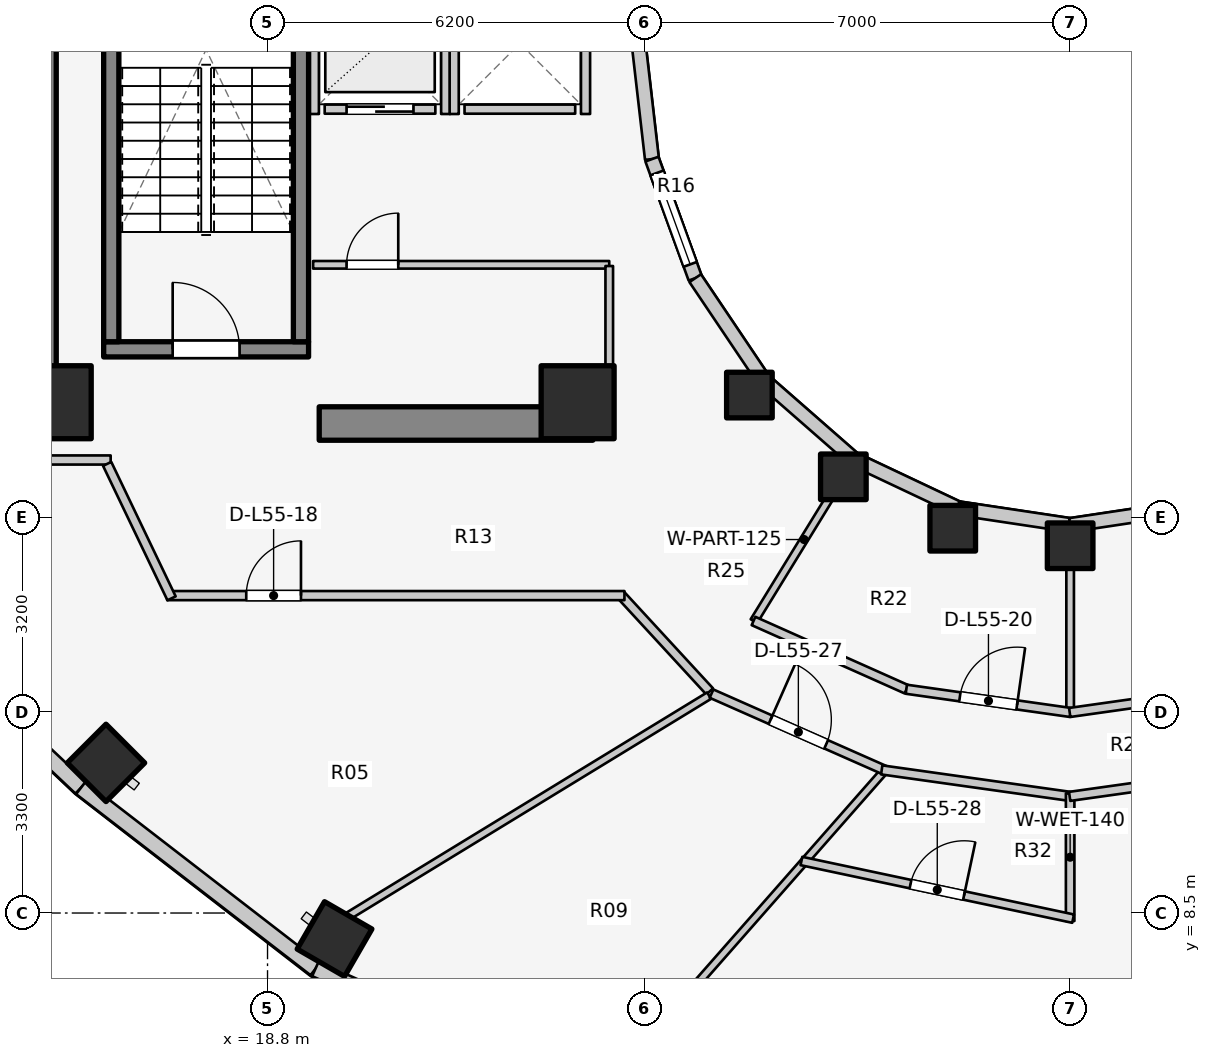
"""IFC4 building model, lengths in metres.
Left out: names, types, materials, properties, quantities, classifications, styles, units other than length and angle.
Written with IfcOpenShell. Run it as: python <this file> out.ifc"""

import sys

from ifc_helpers import new_model, si_unit, direction, frame, frame_2d, origin, origin_2d, place, context, subcontext, project, spatial, rectangle, extrude, element, fill, save


model = new_model("IFC4")
c1 = context("Model", 3, precision=1e-05, world=origin(), true_north=direction((0.0, 1.0)))
c2 = subcontext(c1, "Body", "Model", "MODEL_VIEW")
j1 = project(units=[si_unit("LENGTHUNIT", "METRE"), si_unit("PLANEANGLEUNIT", "RADIAN")], contexts=[c1])
p1 = place(None, origin())
s1 = spatial("IfcSite", under=j1, at=p1, CompositionType="ELEMENT")
p2 = place(p1, origin())
s2 = spatial("IfcBuilding", under=s1, at=p2, CompositionType="ELEMENT")
p3 = place(p2, frame((0.0, 0.0, 180.8)))
s3 = spatial("IfcBuildingStorey", under=s2, at=p3, CompositionType="ELEMENT", Elevation=180.8)
p4 = place(p3, frame((15.05, 17.05, 0.0), z_axis=(0.0, 0.0, 1.0), x_axis=(0.0, 1.0, 0.0)))
e1 = element("IfcWall", 1, at=p4, inside=s3, PredefinedType="SHEAR", context=c2, shape_type="SweptSolid", body=[
    extrude(rectangle(XDim=12.8, YDim=0.55, at=frame_2d((6.4, 0.0))), origin(), (0.0, 0.0, 1.0), 3.1),
])
p5 = place(p3, frame((19.65, 16.55, 0.0), z_axis=(0.0, 0.0, 1.0), x_axis=(1.0, 0.0, 0.0)))
e2 = element("IfcWall", 2, at=p5, inside=s3, PredefinedType="SHEAR", context=c2, shape_type="SweptSolid", body=[
    extrude(rectangle(XDim=4.5, YDim=0.55, at=frame_2d((2.25, 0.0))), origin(), (0.0, 0.0, 1.0), 3.1),
])
p6 = place(p3, frame((16.105, 17.77, 0.0), z_axis=(0.0, 0.0, 1.0), x_axis=(1.0, 0.0, 0.0)))
e3 = element("IfcWall", 3, at=p6, inside=s3, PredefinedType="SOLIDWALL", context=c2, shape_type="SweptSolid", body=[
    extrude(rectangle(XDim=3.37, YDim=0.25, at=frame_2d((1.685, 0.0))), origin(), (0.0, 0.0, 1.0), 3.1),
])
p7 = place(p6, frame((1.135, 0.0, 0.0)))
e4 = element("IfcOpeningElement", 4, at=p7, cuts=e3, PredefinedType="OPENING", context=c2, shape_type="SweptSolid", body=[
    extrude(rectangle(XDim=1.1, YDim=2.1, at=frame_2d((0.55, 1.05))), frame((0.0, 0.135, 0.0), z_axis=(0.0, -1.0, 0.0), x_axis=(1.0, 0.0, 0.0)), (0.0, 0.0, 1.0), 0.27),
])
for number, where, z_axis, x_axis in (
    (5, (16.23, 17.895, 0.0), (0.0, 0.0, 1.0), (0.0, 1.0, 0.0)),
    (6, (19.35, 17.895, 0.0), (0.0, 0.0, 1.0), (0.0, 1.0, 0.0)),
):
    element("IfcWall", number, at=place(p3, frame(where, z_axis=z_axis, x_axis=x_axis)), inside=s3, PredefinedType="SOLIDWALL", context=c2, shape_type="SweptSolid", body=[
        extrude(rectangle(XDim=7.81, YDim=0.25, at=frame_2d((3.905, 0.0))), origin(), (0.0, 0.0, 1.0), 3.1),
    ])
for number, where, z_axis, x_axis in (
    (7, (15.3, 16.9, 0.0), (0.0, 0.0, 1.0), (1.0, 0.0, 0.0)),
    (8, (23.9, 16.9, 0.0), (0.0, 0.0, 1.0), (1.0, 0.0, 0.0)),
):
    element("IfcColumn", number, at=place(p3, frame(where, z_axis=z_axis, x_axis=x_axis)), inside=s3, PredefinedType="COLUMN", context=c2, shape_type="SweptSolid", body=[
        extrude(rectangle(XDim=1.2, YDim=1.2, at=origin_2d()), origin(), (0.0, 0.0, 1.0), 3.1),
    ])
p8 = place(p3, frame((26.725, 17.018, 0.0), z_axis=(0.0, 0.0, 1.0), x_axis=(1.0, 0.0, 0.0)))
e9 = element("IfcColumn", 9, at=p8, inside=s3, PredefinedType="COLUMN", context=c2, shape_type="SweptSolid", body=[
    extrude(rectangle(XDim=0.75, YDim=0.75, at=origin_2d()), origin(), (0.0, 0.0, 1.0), 3.1),
])
p9 = place(p3, frame((16.143, 10.969, 0.0), z_axis=(0.0, 0.0, 1.0), x_axis=(-0.707106781187, -0.707106781187, 0.0)))
e10 = element("IfcColumn", 10, at=p9, inside=s3, PredefinedType="COLUMN", context=c2, shape_type="SweptSolid", body=[
    extrude(rectangle(XDim=0.9, YDim=0.9, at=origin_2d()), origin(), (0.0, 0.0, 1.0), 3.1),
])
p10 = place(p3, frame((28.27, 15.673, 0.0), z_axis=(0.0, 0.0, 1.0), x_axis=(1.0, 0.0, 0.0)))
e11 = element("IfcColumn", 11, at=p10, inside=s3, PredefinedType="COLUMN", context=c2, shape_type="SweptSolid", body=[
    extrude(rectangle(XDim=0.75, YDim=0.75, at=origin_2d()), origin(), (0.0, 0.0, 1.0), 3.1),
])
p11 = place(p3, frame((19.902, 8.072, 0.0), z_axis=(0.0, 0.0, 1.0), x_axis=(-0.5, -0.866025403784, 0.0)))
e12 = element("IfcColumn", 12, at=p11, inside=s3, PredefinedType="COLUMN", context=c2, shape_type="SweptSolid", body=[
    extrude(rectangle(XDim=0.9, YDim=0.9, at=origin_2d()), origin(), (0.0, 0.0, 1.0), 3.1),
])
for number, where, z_axis, x_axis in (
    (13, (30.069, 14.828, 0.0), (0.0, 0.0, 1.0), (1.0, 0.0, 0.0)),
    (14, (32.0, 14.54, 0.0), (0.0, 0.0, 1.0), (1.0, 0.0, 0.0)),
):
    element("IfcColumn", number, at=place(p3, frame(where, z_axis=z_axis, x_axis=x_axis)), inside=s3, PredefinedType="COLUMN", context=c2, shape_type="SweptSolid", body=[
        extrude(rectangle(XDim=0.75, YDim=0.75, at=origin_2d()), origin(), (0.0, 0.0, 1.0), 3.1),
    ])
p12 = place(p3, frame((24.88, 23.0, 0.0), z_axis=(0.0, 0.0, 1.0), x_axis=(0.114711713601, -0.993398823617, 0.0)))
e15 = element("IfcWall", 15, at=p12, inside=s3, PredefinedType="STANDARD", context=c2, shape_type="SweptSolid", body=[
    extrude(rectangle(XDim=2.115, YDim=0.23, at=frame_2d((1.058, 0.0))), origin(), (0.0, 0.0, 1.0), 2.84),
])
p13 = place(p3, frame((25.123, 20.898, 0.0), z_axis=(0.0, 0.0, 1.0), x_axis=(0.341423187295, -0.93990968033, 0.0)))
e16 = element("IfcWall", 16, at=p13, inside=s3, PredefinedType="STANDARD", context=c2, shape_type="SweptSolid", body=[
    extrude(rectangle(XDim=2.084, YDim=0.23, at=frame_2d((1.042, 0.0))), origin(), (0.0, 0.0, 1.0), 2.84),
])
p14 = place(p13, frame((0.242, 0.0, 0.85)))
e17 = element("IfcOpeningElement", 17, at=p14, cuts=e16, PredefinedType="OPENING", context=c2, shape_type="SweptSolid", body=[
    extrude(rectangle(XDim=1.6, YDim=1.65, at=frame_2d((0.8, 0.825))), frame((0.0, 0.125, 0.0), z_axis=(0.0, -1.0, 0.0), x_axis=(1.0, 0.0, 0.0)), (0.0, 0.0, 1.0), 0.25),
])
p15 = place(p3, frame((25.834, 18.94, 0.0), z_axis=(0.0, 0.0, 1.0), x_axis=(0.558197800898, -0.829707909492, 0.0)))
e18 = element("IfcWall", 18, at=p15, inside=s3, PredefinedType="STANDARD", context=c2, shape_type="SweptSolid", body=[
    extrude(rectangle(XDim=2.027, YDim=0.23, at=frame_2d((1.013, 0.0))), origin(), (0.0, 0.0, 1.0), 2.16),
])
p16 = place(p3, frame((26.965, 17.258, 0.0), z_axis=(0.0, 0.0, 1.0), x_axis=(0.752576694707, -0.658504607869, 0.0)))
e19 = element("IfcWall", 19, at=p16, inside=s3, PredefinedType="STANDARD", context=c2, shape_type="SweptSolid", body=[
    extrude(rectangle(XDim=1.959, YDim=0.23, at=frame_2d((0.98, 0.0))), origin(), (0.0, 0.0, 1.0), 2.16),
])
p17 = place(p3, frame((28.44, 15.968, 0.0), z_axis=(0.0, 0.0, 1.0), x_axis=(0.904179699603, -0.427152280606, 0.0)))
e20 = element("IfcWall", 20, at=p17, inside=s3, PredefinedType="STANDARD", context=c2, shape_type="SweptSolid", body=[
    extrude(rectangle(XDim=1.899, YDim=0.23, at=frame_2d((0.95, 0.0))), origin(), (0.0, 0.0, 1.0), 2.16),
])
for number, where, z_axis, x_axis in (
    (21, (30.157, 15.157, 0.0), (0.0, 0.0, 1.0), (0.989, -0.149, 0.0)),
    (22, (32.0, 14.88, 0.0), (0.0, 0.0, 1.0), (0.989, 0.149, 0.0)),
):
    element("IfcWall", number, at=place(p3, frame(where, z_axis=z_axis, x_axis=x_axis)), inside=s3, PredefinedType="STANDARD", context=c2, shape_type="SweptSolid", body=[
        extrude(rectangle(XDim=1.864, YDim=0.23, at=frame_2d((0.932, 0.0))), origin(), (0.0, 0.0, 1.0), 2.16),
    ])
p18 = place(p3, frame((12.381, 13.716, 0.0), z_axis=(0.0, 0.0, 1.0), x_axis=(0.727667301037, -0.68593024354, 0.0)))
e23 = element("IfcWall", 23, at=p18, inside=s3, PredefinedType="STANDARD", context=c2, shape_type="SweptSolid", body=[
    extrude(rectangle(XDim=4.604, YDim=0.26, at=frame_2d((2.302, 0.0))), origin(), (0.0, 0.0, 1.0), 2.85),
])
p19 = place(p18, frame((1.102, 0.0, 0.75)))
e24 = element("IfcOpeningElement", 24, at=p19, cuts=e23, PredefinedType="OPENING", context=c2, shape_type="SweptSolid", body=[
    extrude(rectangle(XDim=2.4, YDim=1.7, at=frame_2d((1.2, 0.85))), frame((0.0, 0.14, 0.0), z_axis=(0.0, -1.0, 0.0), x_axis=(1.0, 0.0, 0.0)), (0.0, 0.0, 1.0), 0.28),
])
p20 = place(p3, frame((15.731, 10.559, 0.0), z_axis=(0.0, 0.0, 1.0), x_axis=(0.791460185804, -0.611220724687, 0.0)))
e25 = element("IfcWall", 25, at=p20, inside=s3, PredefinedType="STANDARD", context=c2, shape_type="SweptSolid", body=[
    extrude(rectangle(XDim=4.872, YDim=0.26, at=frame_2d((2.436, 0.0))), origin(), (0.0, 0.0, 1.0), 2.85),
])
p21 = place(p3, frame((19.587, 7.581, 0.0), z_axis=(0.0, 0.0, 1.0), x_axis=(0.912353637112, -0.409403029847, 0.0)))
e26 = element("IfcWall", 26, at=p21, inside=s3, PredefinedType="STANDARD", context=c2, shape_type="SweptSolid", body=[
    extrude(rectangle(XDim=5.533, YDim=0.26, at=frame_2d((2.766, 0.0))), origin(), (0.0, 0.0, 1.0), 2.85),
])
p22 = place(p21, frame((2.016, 0.0, 0.75)))
e27 = element("IfcOpeningElement", 27, at=p22, cuts=e26, PredefinedType="OPENING", context=c2, shape_type="SweptSolid", body=[
    extrude(rectangle(XDim=1.5, YDim=1.6, at=frame_2d((0.75, 0.8))), frame((0.0, 0.14, 0.0), z_axis=(0.0, -1.0, 0.0), x_axis=(1.0, 0.0, 0.0)), (0.0, 0.0, 1.0), 0.28),
])
p23 = place(p3, frame((19.74, 21.72, 0.0), z_axis=(0.0, 0.0, 1.0), x_axis=(1.0, 0.0, 0.0)))
e28 = element("IfcWall", 28, at=p23, inside=s3, PredefinedType="SOLIDWALL", context=c2, shape_type="SweptSolid", body=[
    extrude(rectangle(XDim=1.82, YDim=0.15, at=frame_2d((0.91, 0.0))), origin(), (0.0, 0.0, 1.0), 2.855),
])
p24 = place(p23, frame((0.36, 0.0, 0.0)))
e29 = element("IfcOpeningElement", 29, at=p24, cuts=e28, PredefinedType="OPENING", context=c2, shape_type="SweptSolid", body=[
    extrude(rectangle(XDim=1.1, YDim=2.1, at=frame_2d((0.55, 1.05))), frame((0.0, 0.085, 0.0), z_axis=(0.0, -1.0, 0.0), x_axis=(1.0, 0.0, 0.0)), (0.0, 0.0, 1.0), 0.17),
])
for number, where, z_axis, x_axis in (
    (30, (19.57, 21.64, 0.0), (0.0, 0.0, 1.0), (0.0, 1.0, 0.0)),
    (31, (21.73, 21.64, 0.0), (0.0, 0.0, 1.0), (0.0, 1.0, 0.0)),
):
    element("IfcWall", number, at=place(p3, frame(where, z_axis=z_axis, x_axis=x_axis)), inside=s3, PredefinedType="SOLIDWALL", context=c2, shape_type="SweptSolid", body=[
        extrude(rectangle(XDim=2.32, YDim=0.15, at=frame_2d((1.16, 0.0))), origin(), (0.0, 0.0, 1.0), 2.855),
    ])
p25 = place(p3, frame((22.04, 21.72, 0.0), z_axis=(0.0, 0.0, 1.0), x_axis=(1.0, 0.0, 0.0)))
e32 = element("IfcWall", 32, at=p25, inside=s3, PredefinedType="SOLIDWALL", context=c2, shape_type="SweptSolid", body=[
    extrude(rectangle(XDim=1.82, YDim=0.15, at=frame_2d((0.91, 0.0))), origin(), (0.0, 0.0, 1.0), 2.12),
])
p26 = place(p3, frame((21.87, 21.64, 0.0), z_axis=(0.0, 0.0, 1.0), x_axis=(0.0, 1.0, 0.0)))
e33 = element("IfcWall", 33, at=p26, inside=s3, PredefinedType="SOLIDWALL", context=c2, shape_type="SweptSolid", body=[
    extrude(rectangle(XDim=2.32, YDim=0.15, at=frame_2d((1.16, 0.0))), origin(), (0.0, 0.0, 1.0), 2.855),
])
p27 = place(p3, frame((24.03, 21.64, 0.0), z_axis=(0.0, 0.0, 1.0), x_axis=(0.0, 1.0, 0.0)))
e34 = element("IfcWall", 34, at=p27, inside=s3, PredefinedType="SOLIDWALL", context=c2, shape_type="SweptSolid", body=[
    extrude(rectangle(XDim=2.32, YDim=0.15, at=frame_2d((1.16, 0.0))), origin(), (0.0, 0.0, 1.0), 2.12),
])
p28 = place(p3, frame((19.55, 19.16, 0.0), z_axis=(0.0, 0.0, 1.0), x_axis=(1.0, 0.0, 0.0)))
e35 = element("IfcWall", 35, at=p28, inside=s3, PredefinedType="PARTITIONING", context=c2, shape_type="SweptSolid", body=[
    extrude(rectangle(XDim=4.87, YDim=0.125, at=frame_2d((2.435, 0.0))), origin(), (0.0, 0.0, 1.0), 2.12),
])
p29 = place(p28, frame((0.55, 0.0, 0.0)))
e36 = element("IfcOpeningElement", 36, at=p29, cuts=e35, PredefinedType="OPENING", context=c2, shape_type="SweptSolid", body=[
    extrude(rectangle(XDim=0.85, YDim=2.05, at=frame_2d((0.425, 1.025))), frame((0.0, 0.073, 0.0), z_axis=(0.0, -1.0, 0.0), x_axis=(1.0, 0.0, 0.0)), (0.0, 0.0, 1.0), 0.145),
])
p30 = place(p3, frame((24.42, 17.1, 0.0), z_axis=(0.0, 0.0, 1.0), x_axis=(0.0, 1.0, 0.0)))
e37 = element("IfcWall", 37, at=p30, inside=s3, PredefinedType="PARTITIONING", context=c2, shape_type="SweptSolid", body=[
    extrude(rectangle(XDim=2.04, YDim=0.125, at=frame_2d((1.02, 0.0))), origin(), (0.0, 0.0, 1.0), 2.232),
])
p31 = place(p3, frame((10.96, 15.95, 0.0), z_axis=(0.0, 0.0, 1.0), x_axis=(1.0, 0.0, 0.0)))
e38 = element("IfcWall", 38, at=p31, inside=s3, PredefinedType="PARTITIONING", context=c2, shape_type="SweptSolid", body=[
    extrude(rectangle(XDim=5.26, YDim=0.15, at=frame_2d((2.63, 0.0))), origin(), (0.0, 0.0, 1.0), 2.22),
])
p32 = place(p3, frame((26.072, 12.144, 0.0), z_axis=(0.0, 0.0, 1.0), x_axis=(-0.677579737957, 0.735449317567, 0.0)))
e39 = element("IfcWall", 39, at=p32, inside=s3, PredefinedType="PARTITIONING", context=c2, shape_type="SweptSolid", body=[
    extrude(rectangle(XDim=2.173, YDim=0.15, at=frame_2d((1.086, 0.0))), origin(), (0.0, 0.0, 1.0), 2.299),
])
p33 = place(p3, frame((17.15, 13.72, 0.0), z_axis=(0.0, 0.0, 1.0), x_axis=(1.0, 0.0, 0.0)))
e40 = element("IfcWall", 40, at=p33, inside=s3, PredefinedType="PARTITIONING", context=c2, shape_type="SweptSolid", body=[
    extrude(rectangle(XDim=7.52, YDim=0.15, at=frame_2d((3.76, 0.0))), origin(), (0.0, 0.0, 1.0), 2.299),
])
p34 = place(p33, frame((1.3, 0.0, 0.0)))
e41 = element("IfcOpeningElement", 41, at=p34, cuts=e40, PredefinedType="OPENING", context=c2, shape_type="SweptSolid", body=[
    extrude(rectangle(XDim=0.9, YDim=2.1, at=frame_2d((0.45, 1.05))), frame((0.0, 0.085, 0.0), z_axis=(0.0, -1.0, 0.0), x_axis=(1.0, 0.0, 0.0)), (0.0, 0.0, 1.0), 0.17),
])
p35 = place(p3, frame((17.222, 13.675, 0.0), z_axis=(0.0, 0.0, 1.0), x_axis=(-0.431973389813, 0.901886351207, 0.0)))
e42 = element("IfcWall", 42, at=p35, inside=s3, PredefinedType="PARTITIONING", context=c2, shape_type="SweptSolid", body=[
    extrude(rectangle(XDim=2.452, YDim=0.15, at=frame_2d((1.226, 0.0))), origin(), (0.0, 0.0, 1.0), 2.855),
])
p36 = place(p3, frame((28.45, 15.985, 0.0), z_axis=(0.0, 0.0, 1.0), x_axis=(-0.523587550846, -0.851971875474, 0.0)))
e43 = element("IfcWall", 43, at=p36, inside=s3, PredefinedType="PARTITIONING", context=c2, shape_type="SweptSolid", body=[
    extrude(rectangle(XDim=3.153, YDim=0.125, at=frame_2d((1.577, 0.0))), origin(), (0.0, 0.0, 1.0), 2.299),
])
p37 = place(p3, frame((32.0, 14.9, 0.0), z_axis=(0.0, 0.0, 1.0), x_axis=(0.0, -1.0, 0.0)))
e44 = element("IfcWall", 44, at=p37, inside=s3, PredefinedType="PARTITIONING", context=c2, shape_type="SweptSolid", body=[
    extrude(rectangle(XDim=3.102, YDim=0.125, at=frame_2d((1.551, 0.0))), origin(), (0.0, 0.0, 1.0), 2.299),
])
p38 = place(p3, frame((26.793, 13.303, 0.0), z_axis=(0.0, 0.0, 1.0), x_axis=(0.913145536541, -0.407633694749, 0.0)))
e45 = element("IfcWall", 45, at=p38, inside=s3, PredefinedType="PARTITIONING", context=c2, shape_type="SweptSolid", body=[
    extrude(rectangle(XDim=2.756, YDim=0.15, at=frame_2d((1.378, 0.0))), origin(), (0.0, 0.0, 1.0), 2.299),
])
p39 = place(p3, frame((29.306, 12.18, 0.0), z_axis=(0.0, 0.0, 1.0), x_axis=(0.990145400278, -0.140043158738, 0.0)))
e46 = element("IfcWall", 46, at=p39, inside=s3, PredefinedType="PARTITIONING", context=c2, shape_type="SweptSolid", body=[
    extrude(rectangle(XDim=2.728, YDim=0.15, at=frame_2d((1.364, 0.0))), origin(), (0.0, 0.0, 1.0), 2.299),
])
p40 = place(p39, frame((0.889, 0.0, 0.0)))
e47 = element("IfcOpeningElement", 47, at=p40, cuts=e46, PredefinedType="OPENING", context=c2, shape_type="SweptSolid", body=[
    extrude(rectangle(XDim=0.95, YDim=2.1, at=frame_2d((0.475, 1.05))), frame((0.0, 0.085, 0.0), z_axis=(0.0, -1.0, 0.0), x_axis=(1.0, 0.0, 0.0)), (0.0, 0.0, 1.0), 0.17),
])
p41 = place(p3, frame((31.993, 11.798, 0.0), z_axis=(0.0, 0.0, 1.0), x_axis=(0.990145400278, 0.140043158738, 0.0)))
e48 = element("IfcWall", 48, at=p41, inside=s3, PredefinedType="PARTITIONING", context=c2, shape_type="SweptSolid", body=[
    extrude(rectangle(XDim=2.728, YDim=0.15, at=frame_2d((1.364, 0.0))), origin(), (0.0, 0.0, 1.0), 2.299),
])
p42 = place(p3, frame((26.062, 12.075, 0.0), z_axis=(0.0, 0.0, 1.0), x_axis=(-0.853440334679, -0.521190555501, 0.0)))
e49 = element("IfcWall", 49, at=p42, inside=s3, PredefinedType="PARTITIONING", context=c2, shape_type="SweptSolid", body=[
    extrude(rectangle(XDim=6.966, YDim=0.125, at=frame_2d((3.483, 0.0))), origin(), (0.0, 0.0, 1.0), 2.299),
])
p43 = place(p3, frame((28.914, 10.805, 0.0), z_axis=(0.0, 0.0, 1.0), x_axis=(-0.660581320981, -0.750754499401, 0.0)))
e50 = element("IfcWall", 50, at=p43, inside=s3, PredefinedType="PARTITIONING", context=c2, shape_type="SweptSolid", body=[
    extrude(rectangle(XDim=6.027, YDim=0.125, at=frame_2d((3.013, 0.0))), origin(), (0.0, 0.0, 1.0), 2.299),
])
p44 = place(p3, frame((26.102, 12.108, 0.0), z_axis=(0.0, 0.0, 1.0), x_axis=(0.914519212393, -0.40454247016, 0.0)))
e51 = element("IfcWall", 51, at=p44, inside=s3, PredefinedType="PARTITIONING", context=c2, shape_type="SweptSolid", body=[
    extrude(rectangle(XDim=3.124, YDim=0.15, at=frame_2d((1.562, 0.0))), origin(), (0.0, 0.0, 1.0), 2.299),
])
p45 = place(p44, frame((1.062, 0.0, 0.0)))
e52 = element("IfcOpeningElement", 52, at=p45, cuts=e51, PredefinedType="OPENING", context=c2, shape_type="SweptSolid", body=[
    extrude(rectangle(XDim=1.0, YDim=2.1, at=frame_2d((0.5, 1.05))), frame((0.0, 0.085, 0.0), z_axis=(0.0, -1.0, 0.0), x_axis=(1.0, 0.0, 0.0)), (0.0, 0.0, 1.0), 0.17),
])
p46 = place(p3, frame((28.901, 10.854, 0.0), z_axis=(0.0, 0.0, 1.0), x_axis=(0.990251283702, -0.139292480508, 0.0)))
e53 = element("IfcWall", 53, at=p46, inside=s3, PredefinedType="PARTITIONING", context=c2, shape_type="SweptSolid", body=[
    extrude(rectangle(XDim=3.179, YDim=0.15, at=frame_2d((1.59, 0.0))), origin(), (0.0, 0.0, 1.0), 2.299),
])
p47 = place(p3, frame((32.0, 10.468, 0.0), z_axis=(0.0, 0.0, 1.0), x_axis=(0.0, -1.0, 0.0)))
e54 = element("IfcWall", 54, at=p47, inside=s3, PredefinedType="PLUMBINGWALL", context=c2, shape_type="SweptSolid", body=[
    extrude(rectangle(XDim=2.1, YDim=0.14, at=frame_2d((1.05, 0.0))), origin(), (0.0, 0.0, 1.0), 2.299),
])
p48 = place(p3, frame((27.581, 9.356, 0.0), z_axis=(0.0, 0.0, 1.0), x_axis=(0.978225905005, -0.20754295646, 0.0)))
e55 = element("IfcWall", 55, at=p48, inside=s3, PredefinedType="PLUMBINGWALL", context=c2, shape_type="SweptSolid", body=[
    extrude(rectangle(XDim=4.568, YDim=0.14, at=frame_2d((2.284, 0.0))), origin(), (0.0, 0.0, 1.0), 2.299),
])
p49 = place(p48, frame((1.834, 0.0, 0.0)))
e56 = element("IfcOpeningElement", 56, at=p49, cuts=e55, PredefinedType="OPENING", context=c2, shape_type="SweptSolid", body=[
    extrude(rectangle(XDim=0.9, YDim=2.1, at=frame_2d((0.45, 1.05))), frame((0.0, 0.08, 0.0), z_axis=(0.0, -1.0, 0.0), x_axis=(1.0, 0.0, 0.0)), (0.0, 0.0, 1.0), 0.16),
])
p50 = place(p3, frame((31.992, 10.418, 0.0), z_axis=(0.0, 0.0, 1.0), x_axis=(0.990254709652, 0.13926812274, 0.0)))
e57 = element("IfcWall", 57, at=p50, inside=s3, PredefinedType="PARTITIONING", context=c2, shape_type="SweptSolid", body=[
    extrude(rectangle(XDim=3.096, YDim=0.15, at=frame_2d((1.548, 0.0))), origin(), (0.0, 0.0, 1.0), 2.299),
])
p51 = place(p14, origin())
e58 = element("IfcWindow", 58, at=p51, inside=s3, PartitioningType="SINGLE_PANEL", PredefinedType="WINDOW", context=c2, shape_type="SweptSolid", body=[
    extrude(rectangle(XDim=1.6, YDim=1.65, at=frame_2d((0.8, 0.825))), frame((0.0, 0.03, 0.0), z_axis=(0.0, -1.0, 0.0), x_axis=(1.0, 0.0, 0.0)), (0.0, 0.0, 1.0), 0.06),
])
fill(e17, e58)
p52 = place(p7, origin())
e59 = element("IfcDoor", 59, at=p52, inside=s3, OperationType="SINGLE_SWING_LEFT", PredefinedType="DOOR", context=c2, shape_type="SweptSolid", body=[
    extrude(rectangle(XDim=1.1, YDim=2.1, at=frame_2d((0.55, 1.05))), frame((0.0, 0.025, 0.0), z_axis=(0.0, -1.0, 0.0), x_axis=(1.0, 0.0, 0.0)), (0.0, 0.0, 1.0), 0.05),
])
fill(e4, e59)
p53 = place(p24, origin())
e60 = element("IfcDoor", 60, at=p53, inside=s3, OperationType="DOUBLE_DOOR_SLIDING", PredefinedType="DOOR", context=c2, shape_type="SweptSolid", body=[
    extrude(rectangle(XDim=1.1, YDim=2.1, at=frame_2d((0.55, 1.05))), frame((0.0, 0.025, 0.0), z_axis=(0.0, -1.0, 0.0), x_axis=(1.0, 0.0, 0.0)), (0.0, 0.0, 1.0), 0.05),
])
fill(e29, e60)
p54 = place(p29, origin())
e61 = element("IfcDoor", 61, at=p54, inside=s3, OperationType="SINGLE_SWING_RIGHT", PredefinedType="DOOR", context=c2, shape_type="SweptSolid", body=[
    extrude(rectangle(XDim=0.85, YDim=2.05, at=frame_2d((0.425, 1.025))), frame((0.0, 0.025, 0.0), z_axis=(0.0, -1.0, 0.0), x_axis=(1.0, 0.0, 0.0)), (0.0, 0.0, 1.0), 0.05),
])
fill(e36, e61)
p55 = place(p34, origin())
e62 = element("IfcDoor", 62, at=p55, inside=s3, OperationType="SINGLE_SWING_RIGHT", PredefinedType="DOOR", context=c2, shape_type="SweptSolid", body=[
    extrude(rectangle(XDim=0.9, YDim=2.1, at=frame_2d((0.45, 1.05))), frame((0.0, 0.025, 0.0), z_axis=(0.0, -1.0, 0.0), x_axis=(1.0, 0.0, 0.0)), (0.0, 0.0, 1.0), 0.05),
])
fill(e41, e62)
p56 = place(p40, origin())
e63 = element("IfcDoor", 63, at=p56, inside=s3, OperationType="SINGLE_SWING_RIGHT", PredefinedType="DOOR", context=c2, shape_type="SweptSolid", body=[
    extrude(rectangle(XDim=0.95, YDim=2.1, at=frame_2d((0.475, 1.05))), frame((0.0, 0.025, 0.0), z_axis=(0.0, -1.0, 0.0), x_axis=(1.0, 0.0, 0.0)), (0.0, 0.0, 1.0), 0.05),
])
fill(e47, e63)
p57 = place(p45, origin())
e64 = element("IfcDoor", 64, at=p57, inside=s3, OperationType="SINGLE_SWING_LEFT", PredefinedType="DOOR", context=c2, shape_type="SweptSolid", body=[
    extrude(rectangle(XDim=1.0, YDim=2.1, at=frame_2d((0.5, 1.05))), frame((0.0, 0.025, 0.0), z_axis=(0.0, -1.0, 0.0), x_axis=(1.0, 0.0, 0.0)), (0.0, 0.0, 1.0), 0.05),
])
fill(e52, e64)
p58 = place(p49, origin())
e65 = element("IfcDoor", 65, at=p58, inside=s3, OperationType="SINGLE_SWING_RIGHT", PredefinedType="DOOR", context=c2, shape_type="SweptSolid", body=[
    extrude(rectangle(XDim=0.9, YDim=2.1, at=frame_2d((0.45, 1.05))), frame((0.0, 0.025, 0.0), z_axis=(0.0, -1.0, 0.0), x_axis=(1.0, 0.0, 0.0)), (0.0, 0.0, 1.0), 0.05),
])
fill(e56, e65)
save(model, sys.argv[1])
